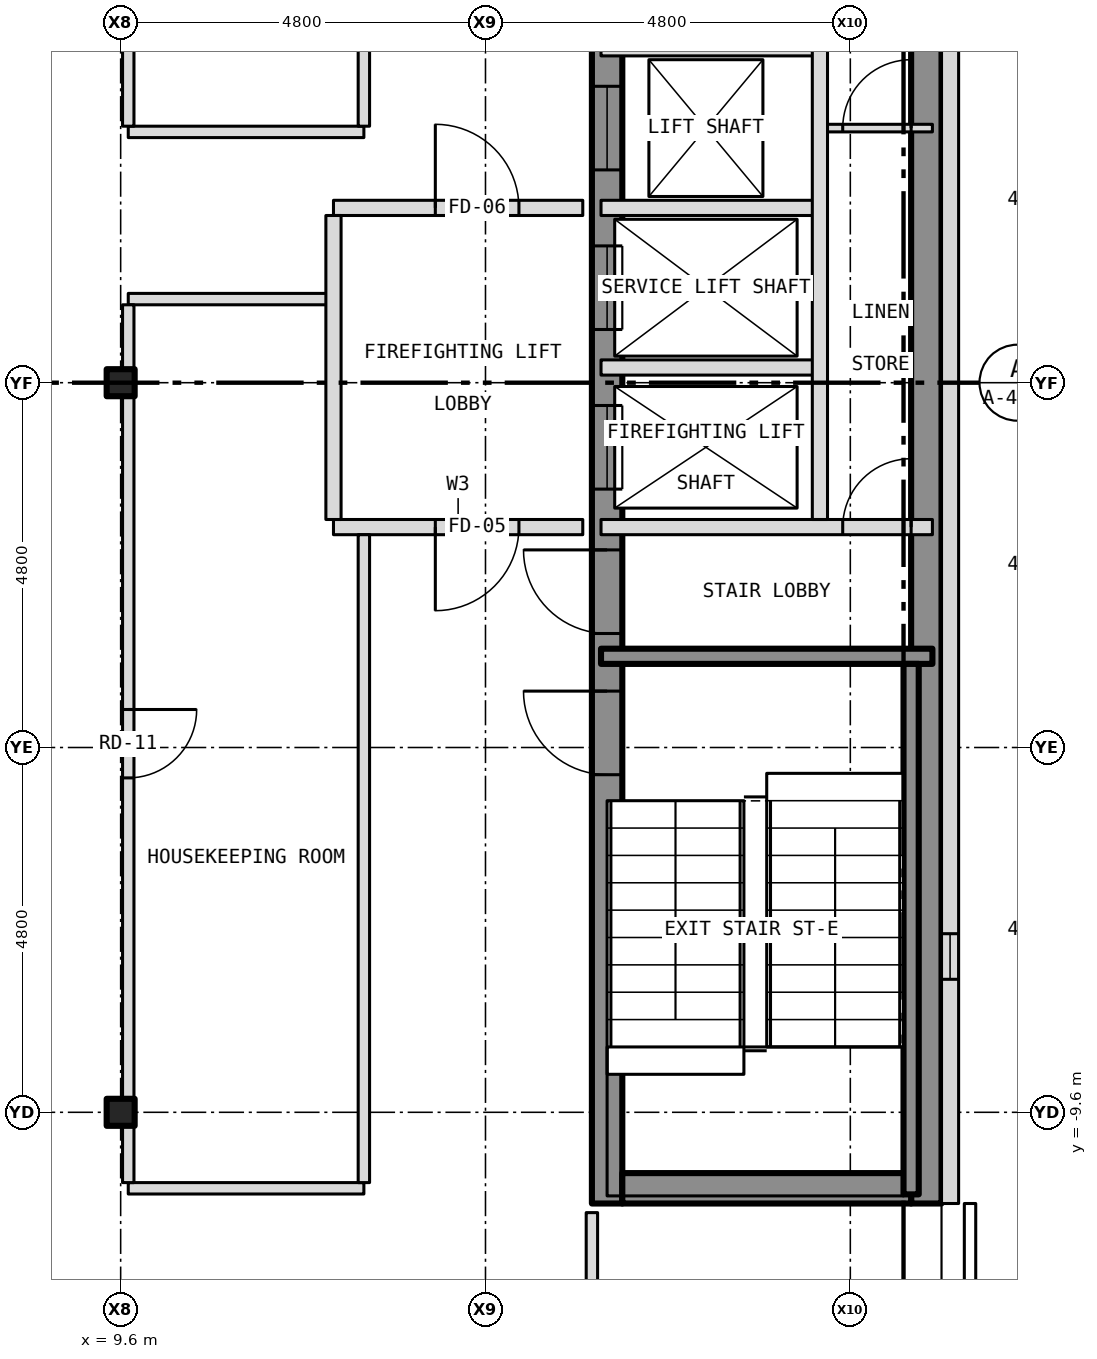
"""IFC4 building model, lengths in metres.
Left out: names, types, materials, properties, quantities, classifications, styles, units other than length and angle.
Written with IfcOpenShell. Run it as: python <this file> out.ifc"""

import sys

from ifc_helpers import new_model, si_unit, direction, frame, frame_2d, origin, origin_2d, place, context, subcontext, project, spatial, rectangle, i_section, extrude, element, fill, save


model = new_model("IFC4")
c1 = context("Model", 3, precision=1e-05, world=origin(), true_north=direction((0.0, 1.0)))
c2 = subcontext(c1, "Body", "Model", "MODEL_VIEW")
j1 = project(units=[si_unit("LENGTHUNIT", "METRE"), si_unit("PLANEANGLEUNIT", "RADIAN")], contexts=[c1])
p1 = place(None, origin())
s1 = spatial("IfcSite", under=j1, at=p1, CompositionType="ELEMENT")
p2 = place(p1, origin())
s2 = spatial("IfcBuilding", under=s1, at=p2, CompositionType="ELEMENT")
p3 = place(p2, frame((0.0, 0.0, 244.5)))
s3 = spatial("IfcBuildingStorey", under=s2, at=p3, CompositionType="ELEMENT", Elevation=244.5)
for number, where, z_axis, x_axis in (
    (1, (9.6, -9.6, -0.15), (0.0, 0.0, 1.0), (1.0, 0.0, 0.0)),
    (2, (9.6, 0.0, -0.15), (0.0, 0.0, 1.0), (1.0, 0.0, 0.0)),
):
    element("IfcColumn", number, at=place(p3, frame(where, z_axis=z_axis, x_axis=x_axis)), inside=s3, PredefinedType="COLUMN", context=c2, shape_type="SweptSolid", body=[
        extrude(i_section(OverallWidth=0.368, OverallDepth=0.356, WebThickness=0.011, FlangeThickness=0.018, at=origin_2d()), origin(), (0.0, 0.0, 1.0), 3.5),
    ])
p4 = place(p3, frame((16.0, -10.8, 0.0), z_axis=(0.0, 0.0, 1.0), x_axis=(0.0, 1.0, 0.0)))
e3 = element("IfcWall", 3, at=p4, inside=s3, PredefinedType="SHEAR", context=c2, shape_type="SweptSolid", body=[
    extrude(rectangle(XDim=21.6, YDim=0.4, at=frame_2d((10.8, 0.0))), origin(), (0.0, 0.0, 1.0), 3.25),
])
p5 = place(p4, frame((9.4, 0.0, 0.0)))
e4 = element("IfcOpeningElement", 4, at=p5, cuts=e3, PredefinedType="OPENING", context=c2, shape_type="SweptSolid", body=[
    extrude(rectangle(XDim=1.1, YDim=2.1, at=frame_2d((0.55, 1.05))), frame((0.0, 0.212, 0.0), z_axis=(0.0, -1.0, 0.0), x_axis=(1.0, 0.0, 0.0)), (0.0, 0.0, 1.0), 0.424),
])
p6 = place(p4, frame((11.5, 0.0, 0.0)))
e5 = element("IfcOpeningElement", 5, at=p6, cuts=e3, PredefinedType="OPENING", context=c2, shape_type="SweptSolid", body=[
    extrude(rectangle(XDim=1.1, YDim=2.1, at=frame_2d((0.55, 1.05))), frame((0.0, 0.212, 0.0), z_axis=(0.0, -1.0, 0.0), x_axis=(1.0, 0.0, 0.0)), (0.0, 0.0, 1.0), 0.424),
])
p7 = place(p4, frame((13.6, 0.0, 0.0)))
e6 = element("IfcOpeningElement", 6, at=p7, cuts=e3, PredefinedType="OPENING", context=c2, shape_type="SweptSolid", body=[
    extrude(rectangle(XDim=1.1, YDim=2.1, at=frame_2d((0.55, 1.05))), frame((0.0, 0.212, 0.0), z_axis=(0.0, -1.0, 0.0), x_axis=(1.0, 0.0, 0.0)), (0.0, 0.0, 1.0), 0.424),
])
p8 = place(p4, frame((15.7, 0.0, 0.0)))
e7 = element("IfcOpeningElement", 7, at=p8, cuts=e3, PredefinedType="OPENING", context=c2, shape_type="SweptSolid", body=[
    extrude(rectangle(XDim=1.1, YDim=2.1, at=frame_2d((0.55, 1.05))), frame((0.0, 0.212, 0.0), z_axis=(0.0, -1.0, 0.0), x_axis=(1.0, 0.0, 0.0)), (0.0, 0.0, 1.0), 0.424),
])
p9 = place(p4, frame((17.8, 0.0, 0.0)))
e8 = element("IfcOpeningElement", 8, at=p9, cuts=e3, PredefinedType="OPENING", context=c2, shape_type="SweptSolid", body=[
    extrude(rectangle(XDim=1.1, YDim=2.1, at=frame_2d((0.55, 1.05))), frame((0.0, 0.212, 0.0), z_axis=(0.0, -1.0, 0.0), x_axis=(1.0, 0.0, 0.0)), (0.0, 0.0, 1.0), 0.424),
])
p10 = place(p4, frame((5.642, 0.0, 0.0)))
e9 = element("IfcOpeningElement", 9, at=p10, cuts=e3, PredefinedType="OPENING", context=c2, shape_type="SweptSolid", body=[
    extrude(rectangle(XDim=1.1, YDim=2.1, at=frame_2d((0.55, 1.05))), frame((0.0, 0.212, 0.0), z_axis=(0.0, -1.0, 0.0), x_axis=(1.0, 0.0, 0.0)), (0.0, 0.0, 1.0), 0.424),
])
p11 = place(p4, frame((7.5, 0.0, 0.0)))
e10 = element("IfcOpeningElement", 10, at=p11, cuts=e3, PredefinedType="OPENING", context=c2, shape_type="SweptSolid", body=[
    extrude(rectangle(XDim=1.1, YDim=2.1, at=frame_2d((0.55, 1.05))), frame((0.0, 0.212, 0.0), z_axis=(0.0, -1.0, 0.0), x_axis=(1.0, 0.0, 0.0)), (0.0, 0.0, 1.0), 0.424),
])
p12 = place(p4, frame((20.0, 0.0, 0.0)))
e11 = element("IfcOpeningElement", 11, at=p12, cuts=e3, PredefinedType="OPENING", context=c2, shape_type="SweptSolid", body=[
    extrude(rectangle(XDim=0.9, YDim=2.1, at=frame_2d((0.45, 1.05))), frame((0.0, 0.212, 0.0), z_axis=(0.0, -1.0, 0.0), x_axis=(1.0, 0.0, 0.0)), (0.0, 0.0, 1.0), 0.424),
])
p13 = place(p3, frame((20.2, -10.8, 0.0), z_axis=(0.0, 0.0, 1.0), x_axis=(0.0, 1.0, 0.0)))
e12 = element("IfcWall", 12, at=p13, inside=s3, PredefinedType="SHEAR", context=c2, shape_type="SweptSolid", body=[
    extrude(rectangle(XDim=21.6, YDim=0.4, at=frame_2d((10.8, 0.0))), origin(), (0.0, 0.0, 1.0), 3.25),
])
p14 = place(p3, frame((16.2, -10.6, 0.0), z_axis=(0.0, 0.0, 1.0), x_axis=(1.0, 0.0, 0.0)))
e13 = element("IfcWall", 13, at=p14, inside=s3, PredefinedType="SHEAR", context=c2, shape_type="SweptSolid", body=[
    extrude(rectangle(XDim=3.8, YDim=0.4, at=frame_2d((1.9, 0.0))), origin(), (0.0, 0.0, 1.0), 3.25),
])
p15 = place(p3, frame((20.512, -10.8, 0.0), z_axis=(0.0, 0.0, 1.0), x_axis=(0.0, 1.0, 0.0)))
e14 = element("IfcWall", 14, at=p15, inside=s3, PredefinedType="SOLIDWALL", context=c2, shape_type="SweptSolid", body=[
    extrude(rectangle(XDim=21.6, YDim=0.225, at=frame_2d((10.8, 0.0))), origin(), (0.0, 0.0, 1.0), 3.5),
])
p16 = place(p15, frame((2.95, 0.0, 1.0)))
e15 = element("IfcOpeningElement", 15, at=p16, cuts=e14, PredefinedType="OPENING", context=c2, shape_type="SweptSolid", body=[
    extrude(rectangle(XDim=0.6, YDim=1.5, at=frame_2d((0.3, 0.75))), frame((0.0, 0.125, 0.0), z_axis=(0.0, -1.0, 0.0), x_axis=(1.0, 0.0, 0.0)), (0.0, 0.0, 1.0), 0.249),
])
p17 = place(p3, frame((9.7, -10.6, 0.0), z_axis=(0.0, 0.0, 1.0), x_axis=(1.0, 0.0, 0.0)))
e16 = element("IfcWall", 16, at=p17, inside=s3, PredefinedType="PARTITIONING", context=c2, shape_type="SweptSolid", body=[
    extrude(rectangle(XDim=3.1, YDim=0.15, at=frame_2d((1.55, 0.0))), origin(), (0.0, 0.0, 1.0), 3.35),
])
p18 = place(p3, frame((15.92, -3.6, 0.0), z_axis=(0.0, 0.0, 1.0), x_axis=(1.0, 0.0, 0.0)))
e17 = element("IfcWall", 17, at=p18, inside=s3, PredefinedType="SHEAR", context=c2, shape_type="SweptSolid", body=[
    extrude(rectangle(XDim=4.36, YDim=0.2, at=frame_2d((2.18, 0.0))), origin(), (0.0, 0.0, 1.0), 3.25),
])
p19 = place(p3, frame((12.4, -1.9, 0.0), z_axis=(0.0, 0.0, 1.0), x_axis=(1.0, 0.0, 0.0)))
e18 = element("IfcWall", 18, at=p19, inside=s3, PredefinedType="PARTITIONING", context=c2, shape_type="SweptSolid", body=[
    extrude(rectangle(XDim=3.28, YDim=0.2, at=frame_2d((1.64, 0.0))), origin(), (0.0, 0.0, 1.0), 3.35),
])
p20 = place(p19, frame((1.34, 0.0, 0.0)))
e19 = element("IfcOpeningElement", 19, at=p20, cuts=e18, PredefinedType="OPENING", context=c2, shape_type="SweptSolid", body=[
    extrude(rectangle(XDim=1.1, YDim=2.1, at=frame_2d((0.55, 1.05))), frame((0.0, 0.112, 0.0), z_axis=(0.0, -1.0, 0.0), x_axis=(1.0, 0.0, 0.0)), (0.0, 0.0, 1.0), 0.224),
])
p21 = place(p3, frame((15.92, -1.9, 0.0), z_axis=(0.0, 0.0, 1.0), x_axis=(1.0, 0.0, 0.0)))
e20 = element("IfcWall", 20, at=p21, inside=s3, PredefinedType="PARTITIONING", context=c2, shape_type="SweptSolid", body=[
    extrude(rectangle(XDim=4.36, YDim=0.2, at=frame_2d((2.18, 0.0))), origin(), (0.0, 0.0, 1.0), 3.25),
])
p22 = place(p21, frame((3.18, 0.0, 0.0)))
e21 = element("IfcOpeningElement", 21, at=p22, cuts=e20, PredefinedType="OPENING", context=c2, shape_type="SweptSolid", body=[
    extrude(rectangle(XDim=0.9, YDim=2.1, at=frame_2d((0.45, 1.05))), frame((0.0, 0.112, 0.0), z_axis=(0.0, -1.0, 0.0), x_axis=(1.0, 0.0, 0.0)), (0.0, 0.0, 1.0), 0.224),
])
p23 = place(p3, frame((15.92, 0.2, 0.0), z_axis=(0.0, 0.0, 1.0), x_axis=(1.0, 0.0, 0.0)))
e22 = element("IfcWall", 22, at=p23, inside=s3, PredefinedType="PARTITIONING", context=c2, shape_type="SweptSolid", body=[
    extrude(rectangle(XDim=2.88, YDim=0.2, at=frame_2d((1.44, 0.0))), origin(), (0.0, 0.0, 1.0), 3.25),
])
p24 = place(p3, frame((9.7, 1.1, 0.0), z_axis=(0.0, 0.0, 1.0), x_axis=(1.0, 0.0, 0.0)))
e23 = element("IfcWall", 23, at=p24, inside=s3, PredefinedType="PARTITIONING", context=c2, shape_type="SweptSolid", body=[
    extrude(rectangle(XDim=2.7, YDim=0.15, at=frame_2d((1.35, 0.0))), origin(), (0.0, 0.0, 1.0), 3.35),
])
p25 = place(p3, frame((12.4, 2.3, 0.0), z_axis=(0.0, 0.0, 1.0), x_axis=(1.0, 0.0, 0.0)))
e24 = element("IfcWall", 24, at=p25, inside=s3, PredefinedType="PARTITIONING", context=c2, shape_type="SweptSolid", body=[
    extrude(rectangle(XDim=3.28, YDim=0.2, at=frame_2d((1.64, 0.0))), origin(), (0.0, 0.0, 1.0), 3.35),
])
p26 = place(p25, frame((1.34, 0.0, 0.0)))
e25 = element("IfcOpeningElement", 25, at=p26, cuts=e24, PredefinedType="OPENING", context=c2, shape_type="SweptSolid", body=[
    extrude(rectangle(XDim=1.1, YDim=2.1, at=frame_2d((0.55, 1.05))), frame((0.0, 0.112, 0.0), z_axis=(0.0, -1.0, 0.0), x_axis=(1.0, 0.0, 0.0)), (0.0, 0.0, 1.0), 0.224),
])
p27 = place(p3, frame((15.92, 2.3, 0.0), z_axis=(0.0, 0.0, 1.0), x_axis=(1.0, 0.0, 0.0)))
e26 = element("IfcWall", 26, at=p27, inside=s3, PredefinedType="PARTITIONING", context=c2, shape_type="SweptSolid", body=[
    extrude(rectangle(XDim=2.88, YDim=0.2, at=frame_2d((1.44, 0.0))), origin(), (0.0, 0.0, 1.0), 3.25),
])
p28 = place(p3, frame((9.7, 3.3, 0.0), z_axis=(0.0, 0.0, 1.0), x_axis=(1.0, 0.0, 0.0)))
e27 = element("IfcWall", 27, at=p28, inside=s3, PredefinedType="PARTITIONING", context=c2, shape_type="SweptSolid", body=[
    extrude(rectangle(XDim=3.1, YDim=0.15, at=frame_2d((1.55, 0.0))), origin(), (0.0, 0.0, 1.0), 3.35),
])
p29 = place(p3, frame((18.8, 3.35, 0.0), z_axis=(0.0, 0.0, 1.0), x_axis=(1.0, 0.0, 0.0)))
e28 = element("IfcWall", 28, at=p29, inside=s3, PredefinedType="PARTITIONING", context=c2, shape_type="SweptSolid", body=[
    extrude(rectangle(XDim=1.48, YDim=0.1, at=frame_2d((0.74, 0.0))), origin(), (0.0, 0.0, 1.0), 3.25),
])
p30 = place(p29, frame((0.3, 0.0, 0.0)))
e29 = element("IfcOpeningElement", 29, at=p30, cuts=e28, PredefinedType="OPENING", context=c2, shape_type="SweptSolid", body=[
    extrude(rectangle(XDim=0.9, YDim=2.1, at=frame_2d((0.45, 1.05))), frame((0.0, 0.062, 0.0), z_axis=(0.0, -1.0, 0.0), x_axis=(1.0, 0.0, 0.0)), (0.0, 0.0, 1.0), 0.124),
])
p31 = place(p3, frame((15.92, 4.4, 0.0), z_axis=(0.0, 0.0, 1.0), x_axis=(1.0, 0.0, 0.0)))
e30 = element("IfcWall", 30, at=p31, inside=s3, PredefinedType="PARTITIONING", context=c2, shape_type="SweptSolid", body=[
    extrude(rectangle(XDim=2.88, YDim=0.2, at=frame_2d((1.44, 0.0))), origin(), (0.0, 0.0, 1.0), 3.25),
])
p32 = place(p3, frame((9.7, -10.525, 0.0), z_axis=(0.0, 0.0, 1.0), x_axis=(0.0, 1.0, 0.0)))
e31 = element("IfcWall", 31, at=p32, inside=s3, PredefinedType="PARTITIONING", context=c2, shape_type="SweptSolid", body=[
    extrude(rectangle(XDim=0.741, YDim=0.15, at=frame_2d((0.371, 0.0))), origin(), (0.0, 0.0, 1.0), 2.728),
])
p33 = place(p3, frame((9.7, -9.784, 0.0), z_axis=(0.0, 0.0, 1.0), x_axis=(0.0, 1.0, 0.0)))
e32 = element("IfcWall", 32, at=p33, inside=s3, PredefinedType="PARTITIONING", context=c2, shape_type="SweptSolid", body=[
    extrude(rectangle(XDim=0.368, YDim=0.15, at=frame_2d((0.184, 0.0))), origin(), (0.0, 0.0, 1.0), 3.35),
])
p34 = place(p3, frame((9.7, -9.416, 0.0), z_axis=(0.0, 0.0, 1.0), x_axis=(0.0, 1.0, 0.0)))
e33 = element("IfcWall", 33, at=p34, inside=s3, PredefinedType="PARTITIONING", context=c2, shape_type="SweptSolid", body=[
    extrude(rectangle(XDim=9.232, YDim=0.15, at=frame_2d((4.616, 0.0))), origin(), (0.0, 0.0, 1.0), 2.728),
])
p35 = place(p34, frame((4.216, 0.0, 0.0)))
e34 = element("IfcOpeningElement", 34, at=p35, cuts=e33, PredefinedType="OPENING", context=c2, shape_type="SweptSolid", body=[
    extrude(rectangle(XDim=0.9, YDim=2.1, at=frame_2d((0.45, 1.05))), frame((0.0, 0.087, 0.0), z_axis=(0.0, -1.0, 0.0), x_axis=(1.0, 0.0, 0.0)), (0.0, 0.0, 1.0), 0.174),
])
p36 = place(p3, frame((9.7, -0.184, 0.0), z_axis=(0.0, 0.0, 1.0), x_axis=(0.0, 1.0, 0.0)))
e35 = element("IfcWall", 35, at=p36, inside=s3, PredefinedType="PARTITIONING", context=c2, shape_type="SweptSolid", body=[
    extrude(rectangle(XDim=0.368, YDim=0.15, at=frame_2d((0.184, 0.0))), origin(), (0.0, 0.0, 1.0), 3.35),
])
p37 = place(p3, frame((9.7, 0.184, 0.0), z_axis=(0.0, 0.0, 1.0), x_axis=(0.0, 1.0, 0.0)))
e36 = element("IfcWall", 36, at=p37, inside=s3, PredefinedType="PARTITIONING", context=c2, shape_type="SweptSolid", body=[
    extrude(rectangle(XDim=0.841, YDim=0.15, at=frame_2d((0.42, 0.0))), origin(), (0.0, 0.0, 1.0), 2.728),
])
p38 = place(p3, frame((9.7, 3.375, 0.0), z_axis=(0.0, 0.0, 1.0), x_axis=(0.0, 1.0, 0.0)))
e37 = element("IfcWall", 37, at=p38, inside=s3, PredefinedType="PARTITIONING", context=c2, shape_type="SweptSolid", body=[
    extrude(rectangle(XDim=6.041, YDim=0.15, at=frame_2d((3.021, 0.0))), origin(), (0.0, 0.0, 1.0), 2.728),
])
p39 = place(p38, frame((1.3, 0.0, 0.0)))
e38 = element("IfcOpeningElement", 38, at=p39, cuts=e37, PredefinedType="OPENING", context=c2, shape_type="SweptSolid", body=[
    extrude(rectangle(XDim=0.9, YDim=2.1, at=frame_2d((0.45, 1.05))), frame((0.0, 0.087, 0.0), z_axis=(0.0, -1.0, 0.0), x_axis=(1.0, 0.0, 0.0)), (0.0, 0.0, 1.0), 0.174),
])
p40 = place(p38, frame((4.35, 0.0, 0.0)))
e39 = element("IfcOpeningElement", 39, at=p40, cuts=e37, PredefinedType="OPENING", context=c2, shape_type="SweptSolid", body=[
    extrude(rectangle(XDim=0.9, YDim=2.1, at=frame_2d((0.45, 1.05))), frame((0.0, 0.087, 0.0), z_axis=(0.0, -1.0, 0.0), x_axis=(1.0, 0.0, 0.0)), (0.0, 0.0, 1.0), 0.174),
])
p41 = place(p3, frame((12.4, -1.8, 0.0), z_axis=(0.0, 0.0, 1.0), x_axis=(0.0, 1.0, 0.0)))
e40 = element("IfcWall", 40, at=p41, inside=s3, PredefinedType="PARTITIONING", context=c2, shape_type="SweptSolid", body=[
    extrude(rectangle(XDim=4.0, YDim=0.2, at=frame_2d((2.0, 0.0))), origin(), (0.0, 0.0, 1.0), 3.35),
])
p42 = place(p3, frame((12.8, -10.525, 0.0), z_axis=(0.0, 0.0, 1.0), x_axis=(0.0, 1.0, 0.0)))
e41 = element("IfcWall", 41, at=p42, inside=s3, PredefinedType="PARTITIONING", context=c2, shape_type="SweptSolid", body=[
    extrude(rectangle(XDim=8.525, YDim=0.15, at=frame_2d((4.262, 0.0))), origin(), (0.0, 0.0, 1.0), 3.35),
])
p43 = place(p3, frame((12.8, 3.375, 0.0), z_axis=(0.0, 0.0, 1.0), x_axis=(0.0, 1.0, 0.0)))
e42 = element("IfcWall", 42, at=p43, inside=s3, PredefinedType="PARTITIONING", context=c2, shape_type="SweptSolid", body=[
    extrude(rectangle(XDim=7.175, YDim=0.15, at=frame_2d((3.587, 0.0))), origin(), (0.0, 0.0, 1.0), 3.35),
])
p44 = place(p3, frame((15.8, -12.725, 0.0), z_axis=(0.0, 0.0, 1.0), x_axis=(0.0, 1.0, 0.0)))
e43 = element("IfcWall", 43, at=p44, inside=s3, PredefinedType="PARTITIONING", context=c2, shape_type="SweptSolid", body=[
    extrude(rectangle(XDim=1.805, YDim=0.15, at=frame_2d((0.903, 0.0))), origin(), (0.0, 0.0, 1.0), 3.35),
])
p45 = place(p3, frame((18.8, -1.8, 0.0), z_axis=(0.0, 0.0, 1.0), x_axis=(0.0, 1.0, 0.0)))
e44 = element("IfcWall", 44, at=p45, inside=s3, PredefinedType="PARTITIONING", context=c2, shape_type="SweptSolid", body=[
    extrude(rectangle(XDim=10.3, YDim=0.2, at=frame_2d((5.15, 0.0))), origin(), (0.0, 0.0, 1.0), 3.25),
])
p46 = place(p3, frame((20.0, -10.68, 0.0), z_axis=(0.0, 0.0, 1.0), x_axis=(0.0, 1.0, 0.0)))
e45 = element("IfcWall", 45, at=p46, inside=s3, PredefinedType="SHEAR", context=c2, shape_type="SweptSolid", body=[
    extrude(rectangle(XDim=6.98, YDim=0.2, at=frame_2d((3.49, 0.0))), origin(), (0.0, 0.0, 1.0), 3.25),
])
p47 = place(p16, origin())
e46 = element("IfcWindow", 46, at=p47, inside=s3, PartitioningType="SINGLE_PANEL", PredefinedType="WINDOW", context=c2, shape_type="SweptSolid", body=[
    extrude(rectangle(XDim=0.6, YDim=1.5, at=frame_2d((0.3, 0.75))), frame((0.0, -0.022, 0.0), z_axis=(0.0, -1.0, 0.0), x_axis=(1.0, 0.0, 0.0)), (0.0, 0.0, 1.0), 0.06),
])
fill(e15, e46)
p48 = place(p5, origin())
e47 = element("IfcDoor", 47, at=p48, inside=s3, OperationType="SLIDING_TO_LEFT", PredefinedType="DOOR", context=c2, shape_type="SweptSolid", body=[
    extrude(rectangle(XDim=1.1, YDim=2.1, at=frame_2d((0.55, 1.05))), frame((0.0, 0.025, 0.0), z_axis=(0.0, -1.0, 0.0), x_axis=(1.0, 0.0, 0.0)), (0.0, 0.0, 1.0), 0.05),
])
fill(e4, e47)
p49 = place(p6, origin())
e48 = element("IfcDoor", 48, at=p49, inside=s3, OperationType="SLIDING_TO_LEFT", PredefinedType="DOOR", context=c2, shape_type="SweptSolid", body=[
    extrude(rectangle(XDim=1.1, YDim=2.1, at=frame_2d((0.55, 1.05))), frame((0.0, 0.025, 0.0), z_axis=(0.0, -1.0, 0.0), x_axis=(1.0, 0.0, 0.0)), (0.0, 0.0, 1.0), 0.05),
])
fill(e5, e48)
p50 = place(p7, origin())
e49 = element("IfcDoor", 49, at=p50, inside=s3, OperationType="SLIDING_TO_LEFT", PredefinedType="DOOR", context=c2, shape_type="SweptSolid", body=[
    extrude(rectangle(XDim=1.1, YDim=2.1, at=frame_2d((0.55, 1.05))), frame((0.0, 0.025, 0.0), z_axis=(0.0, -1.0, 0.0), x_axis=(1.0, 0.0, 0.0)), (0.0, 0.0, 1.0), 0.05),
])
fill(e6, e49)
p51 = place(p10, origin())
e50 = element("IfcDoor", 50, at=p51, inside=s3, OperationType="SINGLE_SWING_RIGHT", PredefinedType="DOOR", context=c2, shape_type="SweptSolid", body=[
    extrude(rectangle(XDim=1.1, YDim=2.1, at=frame_2d((0.55, 1.05))), frame((0.0, 0.025, 0.0), z_axis=(0.0, -1.0, 0.0), x_axis=(1.0, 0.0, 0.0)), (0.0, 0.0, 1.0), 0.05),
])
fill(e9, e50)
p52 = place(p11, origin())
e51 = element("IfcDoor", 51, at=p52, inside=s3, OperationType="SINGLE_SWING_RIGHT", PredefinedType="DOOR", context=c2, shape_type="SweptSolid", body=[
    extrude(rectangle(XDim=1.1, YDim=2.1, at=frame_2d((0.55, 1.05))), frame((0.0, 0.025, 0.0), z_axis=(0.0, -1.0, 0.0), x_axis=(1.0, 0.0, 0.0)), (0.0, 0.0, 1.0), 0.05),
])
fill(e10, e51)
p53 = place(p22, origin())
e52 = element("IfcDoor", 52, at=p53, inside=s3, OperationType="SINGLE_SWING_RIGHT", PredefinedType="DOOR", context=c2, shape_type="SweptSolid", body=[
    extrude(rectangle(XDim=0.9, YDim=2.1, at=frame_2d((0.45, 1.05))), frame((0.0, 0.025, 0.0), z_axis=(0.0, -1.0, 0.0), x_axis=(1.0, 0.0, 0.0)), (0.0, 0.0, 1.0), 0.05),
])
fill(e21, e52)
p54 = place(p30, origin())
e53 = element("IfcDoor", 53, at=p54, inside=s3, OperationType="SINGLE_SWING_RIGHT", PredefinedType="DOOR", context=c2, shape_type="SweptSolid", body=[
    extrude(rectangle(XDim=0.9, YDim=2.1, at=frame_2d((0.45, 1.05))), frame((0.0, 0.025, 0.0), z_axis=(0.0, -1.0, 0.0), x_axis=(1.0, 0.0, 0.0)), (0.0, 0.0, 1.0), 0.05),
])
fill(e29, e53)
p55 = place(p20, origin())
e54 = element("IfcDoor", 54, at=p55, inside=s3, OperationType="SINGLE_SWING_LEFT", PredefinedType="DOOR", context=c2, shape_type="SweptSolid", body=[
    extrude(rectangle(XDim=1.1, YDim=2.1, at=frame_2d((0.55, 1.05))), frame((0.0, 0.025, 0.0), z_axis=(0.0, -1.0, 0.0), x_axis=(1.0, 0.0, 0.0)), (0.0, 0.0, 1.0), 0.05),
])
fill(e19, e54)
p56 = place(p26, origin())
e55 = element("IfcDoor", 55, at=p56, inside=s3, OperationType="SINGLE_SWING_LEFT", PredefinedType="DOOR", context=c2, shape_type="SweptSolid", body=[
    extrude(rectangle(XDim=1.1, YDim=2.1, at=frame_2d((0.55, 1.05))), frame((0.0, 0.025, 0.0), z_axis=(0.0, -1.0, 0.0), x_axis=(1.0, 0.0, 0.0)), (0.0, 0.0, 1.0), 0.05),
])
fill(e25, e55)
p57 = place(p35, origin())
e56 = element("IfcDoor", 56, at=p57, inside=s3, OperationType="SINGLE_SWING_RIGHT", PredefinedType="DOOR", context=c2, shape_type="SweptSolid", body=[
    extrude(rectangle(XDim=0.9, YDim=2.1, at=frame_2d((0.45, 1.05))), frame((0.0, 0.025, 0.0), z_axis=(0.0, -1.0, 0.0), x_axis=(1.0, 0.0, 0.0)), (0.0, 0.0, 1.0), 0.05),
])
fill(e34, e56)
save(model, sys.argv[1])
